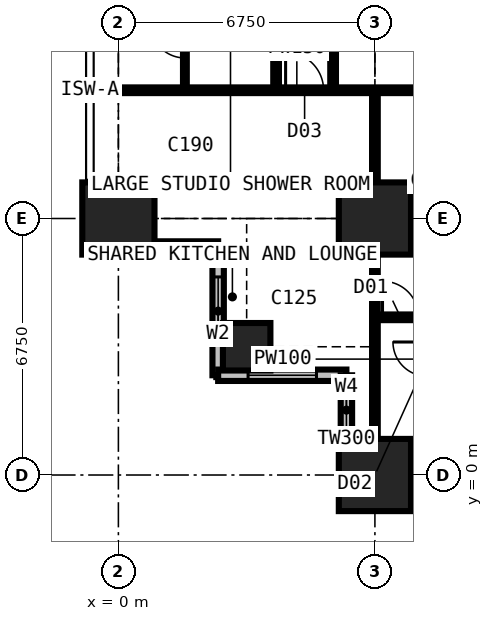
"""IFC4 building model, lengths in metres.
Left out: names, types, materials, properties, quantities, classifications, styles, units other than length and angle.
Written with IfcOpenShell. Run it as: python <this file> out.ifc"""

import sys

from ifc_helpers import new_model, si_unit, direction, frame, frame_2d, origin, origin_2d, place, context, subcontext, project, spatial, rectangle, extrude, element, fill, save


model = new_model("IFC4")
c1 = context("Model", 3, precision=1e-05, world=origin(), true_north=direction((0.0, 1.0)))
c2 = subcontext(c1, "Body", "Model", "MODEL_VIEW")
j1 = project(units=[si_unit("LENGTHUNIT", "METRE"), si_unit("PLANEANGLEUNIT", "RADIAN")], contexts=[c1])
p1 = place(None, origin())
s1 = spatial("IfcSite", under=j1, at=p1, CompositionType="ELEMENT")
p2 = place(p1, origin())
s2 = spatial("IfcBuilding", under=s1, at=p2, CompositionType="ELEMENT")
p3 = place(p2, frame((0.0, 0.0, 25.2)))
s3 = spatial("IfcBuildingStorey", under=s2, at=p3, CompositionType="ELEMENT", Elevation=25.2)
p4 = place(p3, frame((0.0, 6.75, 0.0), z_axis=(0.0, 0.0, 1.0), x_axis=(1.0, 0.0, 0.0)))
e1 = element("IfcColumn", 1, at=p4, inside=s3, PredefinedType="COLUMN", context=c2, shape_type="SweptSolid", body=[
    extrude(rectangle(XDim=1.9, YDim=1.9, at=origin_2d()), origin(), (0.0, 0.0, 1.0), 3.6),
])
p5 = place(p3, frame((3.375, 3.375, 0.0), z_axis=(0.0, 0.0, 1.0), x_axis=(1.0, 0.0, 0.0)))
e2 = element("IfcColumn", 2, at=p5, inside=s3, PredefinedType="COLUMN", context=c2, shape_type="SweptSolid", body=[
    extrude(rectangle(XDim=1.25, YDim=1.25, at=origin_2d()), origin(), (0.0, 0.0, 1.0), 3.6),
])
for number, where, z_axis, x_axis in (
    (3, (6.75, 0.0, 0.0), (0.0, 0.0, 1.0), (1.0, 0.0, 0.0)),
    (4, (6.75, 6.75, 0.0), (0.0, 0.0, 1.0), (1.0, 0.0, 0.0)),
):
    element("IfcColumn", number, at=place(p3, frame(where, z_axis=z_axis, x_axis=x_axis)), inside=s3, PredefinedType="COLUMN", context=c2, shape_type="SweptSolid", body=[
        extrude(rectangle(XDim=1.9, YDim=1.9, at=origin_2d()), origin(), (0.0, 0.0, 1.0), 3.6),
    ])
p6 = place(p3, frame((-0.75, 6.0, 0.0), z_axis=(0.0, 0.0, 1.0), x_axis=(1.0, 0.0, 0.0)))
e5 = element("IfcWall", 5, at=p6, inside=s3, PredefinedType="SOLIDWALL", context=c2, shape_type="SweptSolid", body=[
    extrude(rectangle(XDim=3.375, YDim=0.3, at=frame_2d((1.688, 0.0))), origin(), (0.0, 0.0, 1.0), 3.375),
])
p7 = place(p6, frame((1.857, 0.0, 0.9)))
e6 = element("IfcOpeningElement", 6, at=p7, cuts=e5, PredefinedType="OPENING", context=c2, shape_type="SweptSolid", body=[
    extrude(rectangle(XDim=1.2, YDim=1.8, at=frame_2d((0.6, 0.9))), frame((0.0, 0.16, 0.0), z_axis=(0.0, -1.0, 0.0), x_axis=(1.0, 0.0, 0.0)), (0.0, 0.0, 1.0), 0.32),
])
p8 = place(p3, frame((2.625, 6.0, 0.0), z_axis=(0.0, 0.0, 1.0), x_axis=(0.0, -1.0, 0.0)))
e7 = element("IfcWall", 7, at=p8, inside=s3, PredefinedType="SOLIDWALL", context=c2, shape_type="SweptSolid", body=[
    extrude(rectangle(XDim=3.375, YDim=0.3, at=frame_2d((1.688, 0.0))), origin(), (0.0, 0.0, 1.0), 3.375),
])
p9 = place(p8, frame((0.788, 0.0, 0.6)))
e8 = element("IfcOpeningElement", 8, at=p9, cuts=e7, PredefinedType="OPENING", context=c2, shape_type="SweptSolid", body=[
    extrude(rectangle(XDim=1.8, YDim=2.1, at=frame_2d((0.9, 1.05))), frame((0.0, 0.16, 0.0), z_axis=(0.0, -1.0, 0.0), x_axis=(1.0, 0.0, 0.0)), (0.0, 0.0, 1.0), 0.32),
])
p10 = place(p3, frame((2.625, 2.625, 0.0), z_axis=(0.0, 0.0, 1.0), x_axis=(1.0, 0.0, 0.0)))
e9 = element("IfcWall", 9, at=p10, inside=s3, PredefinedType="SOLIDWALL", context=c2, shape_type="SweptSolid", body=[
    extrude(rectangle(XDim=3.375, YDim=0.3, at=frame_2d((1.688, 0.0))), origin(), (0.0, 0.0, 1.0), 3.375),
])
p11 = place(p10, frame((0.788, 0.0, 0.6)))
e10 = element("IfcOpeningElement", 10, at=p11, cuts=e9, PredefinedType="OPENING", context=c2, shape_type="SweptSolid", body=[
    extrude(rectangle(XDim=1.8, YDim=2.1, at=frame_2d((0.9, 1.05))), frame((0.0, 0.16, 0.0), z_axis=(0.0, -1.0, 0.0), x_axis=(1.0, 0.0, 0.0)), (0.0, 0.0, 1.0), 0.32),
])
p12 = place(p3, frame((6.0, 2.625, 0.0), z_axis=(0.0, 0.0, 1.0), x_axis=(0.0, -1.0, 0.0)))
e11 = element("IfcWall", 11, at=p12, inside=s3, PredefinedType="SOLIDWALL", context=c2, shape_type="SweptSolid", body=[
    extrude(rectangle(XDim=3.375, YDim=0.3, at=frame_2d((1.688, 0.0))), origin(), (0.0, 0.0, 1.0), 3.375),
])
p13 = place(p12, frame((0.317, 0.0, 0.9)))
e12 = element("IfcOpeningElement", 12, at=p13, cuts=e11, PredefinedType="OPENING", context=c2, shape_type="SweptSolid", body=[
    extrude(rectangle(XDim=1.2, YDim=1.8, at=frame_2d((0.6, 0.9))), frame((0.0, 0.16, 0.0), z_axis=(0.0, -1.0, 0.0), x_axis=(1.0, 0.0, 0.0)), (0.0, 0.0, 1.0), 0.32),
])
p14 = place(p3, frame((-0.734, 10.125, 0.0), z_axis=(0.0, 0.0, 1.0), x_axis=(1.0, 0.0, 0.0)))
e13 = element("IfcWall", 13, at=p14, inside=s3, PredefinedType="PARTITIONING", context=c2, shape_type="SweptSolid", body=[
    extrude(rectangle(XDim=10.859, YDim=0.15, at=frame_2d((5.429, 0.0))), origin(), (0.0, 0.0, 1.0), 3.375),
])
p15 = place(p14, frame((5.134, 0.0, 0.0)))
e14 = element("IfcOpeningElement", 14, at=p15, cuts=e13, PredefinedType="OPENING", context=c2, shape_type="SweptSolid", body=[
    extrude(rectangle(XDim=1.0, YDim=2.2, at=frame_2d((0.5, 1.1))), frame((0.0, 0.085, 0.0), z_axis=(0.0, -1.0, 0.0), x_axis=(1.0, 0.0, 0.0)), (0.0, 0.0, 1.0), 0.17),
])
p16 = place(p3, frame((1.75, 10.125, 0.0), z_axis=(0.0, 0.0, 1.0), x_axis=(0.0, 1.0, 0.0)))
e15 = element("IfcWall", 15, at=p16, inside=s3, PredefinedType="PARTITIONING", context=c2, shape_type="SweptSolid", body=[
    extrude(rectangle(XDim=2.6, YDim=0.1, at=frame_2d((1.3, 0.0))), origin(), (0.0, 0.0, 1.0), 3.375),
])
p17 = place(p16, frame((0.85, 0.0, 0.0)))
e16 = element("IfcOpeningElement", 16, at=p17, cuts=e15, PredefinedType="OPENING", context=c2, shape_type="SweptSolid", body=[
    extrude(rectangle(XDim=0.9, YDim=2.2, at=frame_2d((0.45, 1.1))), frame((0.0, 0.06, 0.0), z_axis=(0.0, -1.0, 0.0), x_axis=(1.0, 0.0, 0.0)), (0.0, 0.0, 1.0), 0.12),
])
p18 = place(p3, frame((4.15, 10.125, 0.0), z_axis=(0.0, 0.0, 1.0), x_axis=(0.0, 1.0, 0.0)))
e17 = element("IfcWall", 17, at=p18, inside=s3, PredefinedType="PARTITIONING", context=c2, shape_type="SweptSolid", body=[
    extrude(rectangle(XDim=23.625, YDim=0.15, at=frame_2d((11.812, 0.0))), origin(), (0.0, 0.0, 1.0), 3.375),
])
p19 = place(p18, frame((4.2, 0.0, 0.0)))
e18 = element("IfcOpeningElement", 18, at=p19, cuts=e17, PredefinedType="OPENING", context=c2, shape_type="SweptSolid", body=[
    extrude(rectangle(XDim=0.95, YDim=2.2, at=frame_2d((0.475, 1.1))), frame((0.0, 0.085, 0.0), z_axis=(0.0, -1.0, 0.0), x_axis=(1.0, 0.0, 0.0)), (0.0, 0.0, 1.0), 0.17),
])
p20 = place(p18, frame((10.95, 0.0, 0.0)))
e19 = element("IfcOpeningElement", 19, at=p20, cuts=e17, PredefinedType="OPENING", context=c2, shape_type="SweptSolid", body=[
    extrude(rectangle(XDim=0.95, YDim=2.2, at=frame_2d((0.475, 1.1))), frame((0.0, 0.085, 0.0), z_axis=(0.0, -1.0, 0.0), x_axis=(1.0, 0.0, 0.0)), (0.0, 0.0, 1.0), 0.17),
])
p21 = place(p18, frame((17.7, 0.0, 0.0)))
e20 = element("IfcOpeningElement", 20, at=p21, cuts=e17, PredefinedType="OPENING", context=c2, shape_type="SweptSolid", body=[
    extrude(rectangle(XDim=0.95, YDim=2.2, at=frame_2d((0.475, 1.1))), frame((0.0, 0.085, 0.0), z_axis=(0.0, -1.0, 0.0), x_axis=(1.0, 0.0, 0.0)), (0.0, 0.0, 1.0), 0.17),
])
p22 = place(p18, frame((20.5, 0.0, 0.0)))
e21 = element("IfcOpeningElement", 21, at=p22, cuts=e17, PredefinedType="OPENING", context=c2, shape_type="SweptSolid", body=[
    extrude(rectangle(XDim=0.95, YDim=2.2, at=frame_2d((0.475, 1.1))), frame((0.0, 0.085, 0.0), z_axis=(0.0, -1.0, 0.0), x_axis=(1.0, 0.0, 0.0)), (0.0, 0.0, 1.0), 0.17),
])
p23 = place(p3, frame((5.65, 10.125, 0.0), z_axis=(0.0, 0.0, 1.0), x_axis=(0.0, 1.0, 0.0)))
e22 = element("IfcWall", 22, at=p23, inside=s3, PredefinedType="PARTITIONING", context=c2, shape_type="SweptSolid", body=[
    extrude(rectangle(XDim=10.762, YDim=0.15, at=frame_2d((5.381, 0.0))), origin(), (0.0, 0.0, 1.0), 3.375),
])
p24 = place(p23, frame((4.9, 0.0, 0.0)))
e23 = element("IfcOpeningElement", 23, at=p24, cuts=e22, PredefinedType="OPENING", context=c2, shape_type="SweptSolid", body=[
    extrude(rectangle(XDim=0.95, YDim=2.2, at=frame_2d((0.475, 1.1))), frame((0.0, 0.085, 0.0), z_axis=(0.0, -1.0, 0.0), x_axis=(1.0, 0.0, 0.0)), (0.0, 0.0, 1.0), 0.17),
])
p25 = place(p3, frame((6.75, -0.734, 0.0), z_axis=(0.0, 0.0, 1.0), x_axis=(0.0, 1.0, 0.0)))
e24 = element("IfcWall", 24, at=p25, inside=s3, PredefinedType="PARTITIONING", context=c2, shape_type="SweptSolid", body=[
    extrude(rectangle(XDim=10.859, YDim=0.15, at=frame_2d((5.429, 0.0))), origin(), (0.0, 0.0, 1.0), 2.877),
])
p26 = place(p3, frame((6.75, 4.15, 0.0), z_axis=(0.0, 0.0, 1.0), x_axis=(1.0, 0.0, 0.0)))
e25 = element("IfcWall", 25, at=p26, inside=s3, PredefinedType="PARTITIONING", context=c2, shape_type="SweptSolid", body=[
    extrude(rectangle(XDim=23.625, YDim=0.15, at=frame_2d((11.812, 0.0))), origin(), (0.0, 0.0, 1.0), 3.375),
])
p27 = place(p26, frame((0.2, 0.0, 0.0)))
e26 = element("IfcOpeningElement", 26, at=p27, cuts=e25, PredefinedType="OPENING", context=c2, shape_type="SweptSolid", body=[
    extrude(rectangle(XDim=0.95, YDim=2.2, at=frame_2d((0.475, 1.1))), frame((0.0, 0.085, 0.0), z_axis=(0.0, -1.0, 0.0), x_axis=(1.0, 0.0, 0.0)), (0.0, 0.0, 1.0), 0.17),
])
p28 = place(p26, frame((3.625, 0.0, 0.0)))
e27 = element("IfcOpeningElement", 27, at=p28, cuts=e25, PredefinedType="OPENING", context=c2, shape_type="SweptSolid", body=[
    extrude(rectangle(XDim=0.95, YDim=2.2, at=frame_2d((0.475, 1.1))), frame((0.0, 0.085, 0.0), z_axis=(0.0, -1.0, 0.0), x_axis=(1.0, 0.0, 0.0)), (0.0, 0.0, 1.0), 0.17),
])
p29 = place(p26, frame((18.475, 0.0, 0.0)))
e28 = element("IfcOpeningElement", 28, at=p29, cuts=e25, PredefinedType="OPENING", context=c2, shape_type="SweptSolid", body=[
    extrude(rectangle(XDim=0.95, YDim=2.2, at=frame_2d((0.475, 1.1))), frame((0.0, 0.085, 0.0), z_axis=(0.0, -1.0, 0.0), x_axis=(1.0, 0.0, 0.0)), (0.0, 0.0, 1.0), 0.17),
])
p30 = place(p26, frame((11.725, 0.0, 0.0)))
e29 = element("IfcOpeningElement", 29, at=p30, cuts=e25, PredefinedType="OPENING", context=c2, shape_type="SweptSolid", body=[
    extrude(rectangle(XDim=0.95, YDim=2.2, at=frame_2d((0.475, 1.1))), frame((0.0, 0.085, 0.0), z_axis=(0.0, -1.0, 0.0), x_axis=(1.0, 0.0, 0.0)), (0.0, 0.0, 1.0), 0.17),
])
p31 = place(p26, frame((6.95, 0.0, 0.0)))
e30 = element("IfcOpeningElement", 30, at=p31, cuts=e25, PredefinedType="OPENING", context=c2, shape_type="SweptSolid", body=[
    extrude(rectangle(XDim=0.95, YDim=2.2, at=frame_2d((0.475, 1.1))), frame((0.0, 0.085, 0.0), z_axis=(0.0, -1.0, 0.0), x_axis=(1.0, 0.0, 0.0)), (0.0, 0.0, 1.0), 0.17),
])
p32 = place(p7, origin())
e31 = element("IfcWindow", 31, at=p32, inside=s3, PartitioningType="SINGLE_PANEL", PredefinedType="WINDOW", context=c2, shape_type="SweptSolid", body=[
    extrude(rectangle(XDim=1.2, YDim=1.8, at=frame_2d((0.6, 0.9))), frame((0.0, 0.03, 0.0), z_axis=(0.0, -1.0, 0.0), x_axis=(1.0, 0.0, 0.0)), (0.0, 0.0, 1.0), 0.06),
])
fill(e6, e31)
p33 = place(p9, origin())
e32 = element("IfcWindow", 32, at=p33, inside=s3, PartitioningType="SINGLE_PANEL", PredefinedType="WINDOW", context=c2, shape_type="SweptSolid", body=[
    extrude(rectangle(XDim=1.8, YDim=2.1, at=frame_2d((0.9, 1.05))), frame((0.0, 0.03, 0.0), z_axis=(0.0, -1.0, 0.0), x_axis=(1.0, 0.0, 0.0)), (0.0, 0.0, 1.0), 0.06),
])
fill(e8, e32)
p34 = place(p11, origin())
e33 = element("IfcWindow", 33, at=p34, inside=s3, PartitioningType="SINGLE_PANEL", PredefinedType="WINDOW", context=c2, shape_type="SweptSolid", body=[
    extrude(rectangle(XDim=1.8, YDim=2.1, at=frame_2d((0.9, 1.05))), frame((0.0, 0.03, 0.0), z_axis=(0.0, -1.0, 0.0), x_axis=(1.0, 0.0, 0.0)), (0.0, 0.0, 1.0), 0.06),
])
fill(e10, e33)
p35 = place(p13, origin())
e34 = element("IfcWindow", 34, at=p35, inside=s3, PartitioningType="SINGLE_PANEL", PredefinedType="WINDOW", context=c2, shape_type="SweptSolid", body=[
    extrude(rectangle(XDim=1.2, YDim=1.8, at=frame_2d((0.6, 0.9))), frame((0.0, 0.03, 0.0), z_axis=(0.0, -1.0, 0.0), x_axis=(1.0, 0.0, 0.0)), (0.0, 0.0, 1.0), 0.06),
])
fill(e12, e34)
p36 = place(p15, origin())
e35 = element("IfcDoor", 35, at=p36, inside=s3, OperationType="SINGLE_SWING_LEFT", PredefinedType="DOOR", context=c2, shape_type="SweptSolid", body=[
    extrude(rectangle(XDim=1.0, YDim=2.2, at=frame_2d((0.5, 1.1))), frame((0.0, 0.025, 0.0), z_axis=(0.0, -1.0, 0.0), x_axis=(1.0, 0.0, 0.0)), (0.0, 0.0, 1.0), 0.05),
])
fill(e14, e35)
p37 = place(p27, origin())
e36 = element("IfcDoor", 36, at=p37, inside=s3, OperationType="SINGLE_SWING_LEFT", PredefinedType="DOOR", context=c2, shape_type="SweptSolid", body=[
    extrude(rectangle(XDim=0.95, YDim=2.2, at=frame_2d((0.475, 1.1))), frame((0.0, 0.025, 0.0), z_axis=(0.0, -1.0, 0.0), x_axis=(1.0, 0.0, 0.0)), (0.0, 0.0, 1.0), 0.05),
])
fill(e26, e36)
p38 = place(p17, origin())
e37 = element("IfcDoor", 37, at=p38, inside=s3, OperationType="SINGLE_SWING_RIGHT", PredefinedType="DOOR", context=c2, shape_type="SweptSolid", body=[
    extrude(rectangle(XDim=0.9, YDim=2.2, at=frame_2d((0.45, 1.1))), frame((0.0, 0.025, 0.0), z_axis=(0.0, -1.0, 0.0), x_axis=(1.0, 0.0, 0.0)), (0.0, 0.0, 1.0), 0.05),
])
fill(e16, e37)
save(model, sys.argv[1])
